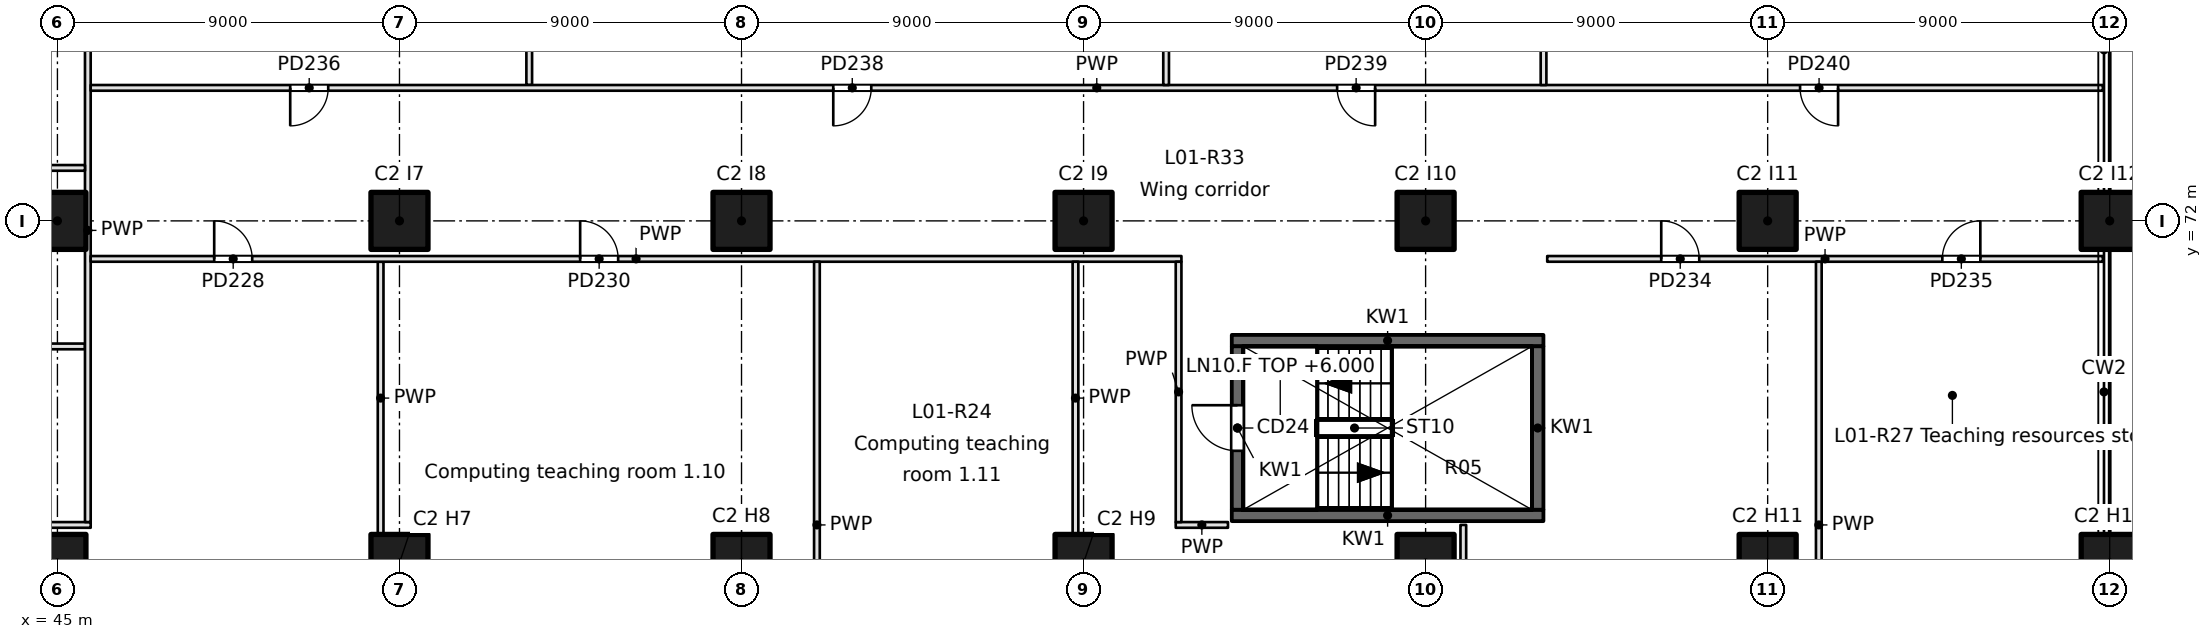
"""IFC4 building model, lengths in metres.
Left out: names, types, materials, properties, quantities, classifications, styles, units other than length and angle.
Written with IfcOpenShell. Run it as: python <this file> out.ifc"""

import sys

from ifc_helpers import new_model, si_unit, direction, frame, frame_2d, origin, origin_2d, place, context, subcontext, project, spatial, rectangle, extrude, element, fill, save


model = new_model("IFC4")
c1 = context("Model", 3, precision=1e-05, world=origin(), true_north=direction((0.0, 1.0)))
c2 = subcontext(c1, "Body", "Model", "MODEL_VIEW")
j1 = project(units=[si_unit("LENGTHUNIT", "METRE"), si_unit("PLANEANGLEUNIT", "RADIAN")], contexts=[c1])
p1 = place(None, origin())
s1 = spatial("IfcSite", under=j1, at=p1, CompositionType="ELEMENT")
p2 = place(p1, origin())
s2 = spatial("IfcBuilding", under=s1, at=p2, CompositionType="ELEMENT")
p3 = place(p2, frame((0.0, 0.0, 6.0)))
s3 = spatial("IfcBuildingStorey", under=s2, at=p3, CompositionType="ELEMENT", Elevation=6.0)
for number, where, z_axis, x_axis in (
    (1, (99.0, 63.0, 0.0), (0.0, 0.0, 1.0), (1.0, 0.0, 0.0)),
    (2, (99.0, 72.0, 0.0), (0.0, 0.0, 1.0), (1.0, 0.0, 0.0)),
    (3, (45.0, 63.0, 0.0), (0.0, 0.0, 1.0), (1.0, 0.0, 0.0)),
    (4, (45.0, 72.0, 0.0), (0.0, 0.0, 1.0), (1.0, 0.0, 0.0)),
    (5, (54.0, 63.0, 0.0), (0.0, 0.0, 1.0), (1.0, 0.0, 0.0)),
    (6, (54.0, 72.0, 0.0), (0.0, 0.0, 1.0), (1.0, 0.0, 0.0)),
    (7, (63.0, 63.0, 0.0), (0.0, 0.0, 1.0), (1.0, 0.0, 0.0)),
    (8, (63.0, 72.0, 0.0), (0.0, 0.0, 1.0), (1.0, 0.0, 0.0)),
    (9, (72.0, 63.0, 0.0), (0.0, 0.0, 1.0), (1.0, 0.0, 0.0)),
    (10, (72.0, 72.0, 0.0), (0.0, 0.0, 1.0), (1.0, 0.0, 0.0)),
    (11, (81.0, 63.0, 0.0), (0.0, 0.0, 1.0), (1.0, 0.0, 0.0)),
    (12, (81.0, 72.0, 0.0), (0.0, 0.0, 1.0), (1.0, 0.0, 0.0)),
    (13, (90.0, 63.0, 0.0), (0.0, 0.0, 1.0), (1.0, 0.0, 0.0)),
    (14, (90.0, 72.0, 0.0), (0.0, 0.0, 1.0), (1.0, 0.0, 0.0)),
):
    element("IfcColumn", number, at=place(p3, frame(where, z_axis=z_axis, x_axis=x_axis)), inside=s3, PredefinedType="COLUMN", context=c2, shape_type="SweptSolid", body=[
        extrude(rectangle(XDim=1.5, YDim=1.5, at=origin_2d()), origin(), (0.0, 0.0, 1.0), 5.4),
    ])
for number, where, z_axis, x_axis in (
    (15, (75.9, 64.25, -0.35), (0.0, 0.0, 1.0), (1.0, 0.0, 0.0)),
    (16, (75.9, 68.85, -0.35), (0.0, 0.0, 1.0), (1.0, 0.0, 0.0)),
):
    element("IfcWall", number, at=place(p3, frame(where, z_axis=z_axis, x_axis=x_axis)), inside=s3, PredefinedType="SOLIDWALL", context=c2, shape_type="SweptSolid", body=[
        extrude(rectangle(XDim=8.2, YDim=0.3, at=frame_2d((4.1, 0.0))), origin(), (0.0, 0.0, 1.0), 5.4),
    ])
p4 = place(p3, frame((76.05, 64.4, -0.35), z_axis=(0.0, 0.0, 1.0), x_axis=(0.0, 1.0, 0.0)))
e17 = element("IfcWall", 17, at=p4, inside=s3, PredefinedType="SOLIDWALL", context=c2, shape_type="SweptSolid", body=[
    extrude(rectangle(XDim=4.3, YDim=0.3, at=frame_2d((2.15, 0.0))), origin(), (0.0, 0.0, 1.0), 5.4),
])
p5 = place(p4, frame((1.55, 0.0, 0.35)))
e18 = element("IfcOpeningElement", 18, at=p5, cuts=e17, PredefinedType="OPENING", context=c2, shape_type="SweptSolid", body=[
    extrude(rectangle(XDim=1.2, YDim=2.1, at=frame_2d((0.6, 1.05))), frame((0.0, 0.15, 0.0), z_axis=(0.0, -1.0, 0.0), x_axis=(1.0, 0.0, 0.0)), (0.0, 0.0, 1.0), 0.3),
])
p6 = place(p3, frame((83.95, 64.4, -0.35), z_axis=(0.0, 0.0, 1.0), x_axis=(0.0, 1.0, 0.0)))
e19 = element("IfcWall", 19, at=p6, inside=s3, PredefinedType="SOLIDWALL", context=c2, shape_type="SweptSolid", body=[
    extrude(rectangle(XDim=4.3, YDim=0.3, at=frame_2d((2.15, 0.0))), origin(), (0.0, 0.0, 1.0), 5.4),
])
p7 = place(p3, frame((40.575, 68.697, 0.0), z_axis=(0.0, 0.0, 1.0), x_axis=(1.0, 0.0, 0.0)))
e20 = element("IfcWall", 20, at=p7, inside=s3, PredefinedType="PARTITIONING", context=c2, shape_type="SweptSolid", body=[
    extrude(rectangle(XDim=5.15, YDim=0.15, at=frame_2d((2.575, 0.0))), origin(), (0.0, 0.0, 1.0), 5.05),
])
p8 = place(p3, frame((45.875, 64.0, 0.0), z_axis=(0.0, 0.0, 1.0), x_axis=(-1.0, 0.0, 0.0)))
e21 = element("IfcWall", 21, at=p8, inside=s3, PredefinedType="PARTITIONING", context=c2, shape_type="SweptSolid", body=[
    extrude(rectangle(XDim=5.45, YDim=0.15, at=frame_2d((2.725, 0.0))), origin(), (0.0, 0.0, 1.0), 5.05),
])
p9 = place(p3, frame((74.425, 64.0, 0.0), z_axis=(0.0, 0.0, 1.0), x_axis=(1.0, 0.0, 0.0)))
e22 = element("IfcWall", 22, at=p9, inside=s3, PredefinedType="PARTITIONING", context=c2, shape_type="SweptSolid", body=[
    extrude(rectangle(XDim=1.375, YDim=0.15, at=frame_2d((0.688, 0.0))), origin(), (0.0, 0.0, 1.0), 5.05),
])
p10 = place(p3, frame((45.8, 79.425, 0.0), z_axis=(0.0, 0.0, 1.0), x_axis=(0.0, -1.0, 0.0)))
e23 = element("IfcWall", 23, at=p10, inside=s3, PredefinedType="PARTITIONING", context=c2, shape_type="SweptSolid", body=[
    extrude(rectangle(XDim=15.35, YDim=0.15, at=frame_2d((7.675, 0.0))), origin(), (0.0, 0.0, 1.0), 5.05),
])
p11 = place(p3, frame((40.575, 73.394, 0.0), z_axis=(0.0, 0.0, 1.0), x_axis=(1.0, 0.0, 0.0)))
e24 = element("IfcWall", 24, at=p11, inside=s3, PredefinedType="PARTITIONING", context=c2, shape_type="SweptSolid", body=[
    extrude(rectangle(XDim=5.15, YDim=0.15, at=frame_2d((2.575, 0.0))), origin(), (0.0, 0.0, 1.0), 5.05),
])
p12 = place(p3, frame((53.504, 63.75, 0.0), z_axis=(0.0, 0.0, 1.0), x_axis=(0.0, 1.0, 0.0)))
e25 = element("IfcWall", 25, at=p12, inside=s3, PredefinedType="PARTITIONING", context=c2, shape_type="SweptSolid", body=[
    extrude(rectangle(XDim=7.175, YDim=0.15, at=frame_2d((3.587, 0.0))), origin(), (0.0, 0.0, 1.0), 5.05),
])
p13 = place(p3, frame((45.875, 71.0, 0.0), z_axis=(0.0, 0.0, 1.0), x_axis=(1.0, 0.0, 0.0)))
e26 = element("IfcWall", 26, at=p13, inside=s3, PredefinedType="PARTITIONING", context=c2, shape_type="SweptSolid", body=[
    extrude(rectangle(XDim=28.7, YDim=0.15, at=frame_2d((14.35, 0.0))), origin(), (0.0, 0.0, 1.0), 5.05),
])
p14 = place(p13, frame((3.25, 0.0, 0.0)))
e27 = element("IfcOpeningElement", 27, at=p14, cuts=e26, PredefinedType="OPENING", context=c2, shape_type="SweptSolid", body=[
    extrude(rectangle(XDim=1.0, YDim=2.1, at=frame_2d((0.5, 1.05))), frame((0.0, 0.075, 0.0), z_axis=(0.0, -1.0, 0.0), x_axis=(1.0, 0.0, 0.0)), (0.0, 0.0, 1.0), 0.15),
])
p15 = place(p13, frame((12.879, 0.0, 0.0)))
e28 = element("IfcOpeningElement", 28, at=p15, cuts=e26, PredefinedType="OPENING", context=c2, shape_type="SweptSolid", body=[
    extrude(rectangle(XDim=1.0, YDim=2.1, at=frame_2d((0.5, 1.05))), frame((0.0, 0.075, 0.0), z_axis=(0.0, -1.0, 0.0), x_axis=(1.0, 0.0, 0.0)), (0.0, 0.0, 1.0), 0.15),
])
p16 = place(p3, frame((84.2, 71.0, 0.0), z_axis=(0.0, 0.0, 1.0), x_axis=(1.0, 0.0, 0.0)))
e29 = element("IfcWall", 29, at=p16, inside=s3, PredefinedType="PARTITIONING", context=c2, shape_type="SweptSolid", body=[
    extrude(rectangle(XDim=14.62, YDim=0.15, at=frame_2d((7.31, 0.0))), origin(), (0.0, 0.0, 1.0), 5.05),
])
p17 = place(p16, frame((3.0, 0.0, 0.0)))
e30 = element("IfcOpeningElement", 30, at=p17, cuts=e29, PredefinedType="OPENING", context=c2, shape_type="SweptSolid", body=[
    extrude(rectangle(XDim=1.0, YDim=2.1, at=frame_2d((0.5, 1.05))), frame((0.0, 0.075, 0.0), z_axis=(0.0, -1.0, 0.0), x_axis=(1.0, 0.0, 0.0)), (0.0, 0.0, 1.0), 0.15),
])
p18 = place(p16, frame((10.396, 0.0, 0.0)))
e31 = element("IfcOpeningElement", 31, at=p18, cuts=e29, PredefinedType="OPENING", context=c2, shape_type="SweptSolid", body=[
    extrude(rectangle(XDim=1.0, YDim=2.1, at=frame_2d((0.5, 1.05))), frame((0.0, 0.075, 0.0), z_axis=(0.0, -1.0, 0.0), x_axis=(1.0, 0.0, 0.0)), (0.0, 0.0, 1.0), 0.15),
])
p19 = place(p3, frame((64.984, 57.075, 0.0), z_axis=(0.0, 0.0, 1.0), x_axis=(0.0, 1.0, 0.0)))
e32 = element("IfcWall", 32, at=p19, inside=s3, PredefinedType="PARTITIONING", context=c2, shape_type="SweptSolid", body=[
    extrude(rectangle(XDim=13.85, YDim=0.15, at=frame_2d((6.925, 0.0))), origin(), (0.0, 0.0, 1.0), 5.05),
])
p20 = place(p3, frame((71.787, 63.75, 0.0), z_axis=(0.0, 0.0, 1.0), x_axis=(0.0, 1.0, 0.0)))
e33 = element("IfcWall", 33, at=p20, inside=s3, PredefinedType="PARTITIONING", context=c2, shape_type="SweptSolid", body=[
    extrude(rectangle(XDim=7.175, YDim=0.15, at=frame_2d((3.587, 0.0))), origin(), (0.0, 0.0, 1.0), 5.05),
])
p21 = place(p3, frame((81.992, 57.075, 0.0), z_axis=(0.0, 0.0, 1.0), x_axis=(0.0, 1.0, 0.0)))
e34 = element("IfcWall", 34, at=p21, inside=s3, PredefinedType="PARTITIONING", context=c2, shape_type="SweptSolid", body=[
    extrude(rectangle(XDim=6.925, YDim=0.15, at=frame_2d((3.462, 0.0))), origin(), (0.0, 0.0, 1.0), 5.05),
])
p22 = place(p3, frame((74.5, 70.925, 0.0), z_axis=(0.0, 0.0, 1.0), x_axis=(0.0, -1.0, 0.0)))
e35 = element("IfcWall", 35, at=p22, inside=s3, PredefinedType="PARTITIONING", context=c2, shape_type="SweptSolid", body=[
    extrude(rectangle(XDim=6.85, YDim=0.15, at=frame_2d((3.425, 0.0))), origin(), (0.0, 0.0, 1.0), 5.05),
])
p23 = place(p3, frame((91.346, 57.075, 0.0), z_axis=(0.0, 0.0, 1.0), x_axis=(0.0, 1.0, 0.0)))
e36 = element("IfcWall", 36, at=p23, inside=s3, PredefinedType="PARTITIONING", context=c2, shape_type="SweptSolid", body=[
    extrude(rectangle(XDim=13.85, YDim=0.15, at=frame_2d((6.925, 0.0))), origin(), (0.0, 0.0, 1.0), 5.05),
])
p24 = place(p3, frame((57.414, 75.575, 0.0), z_axis=(0.0, 0.0, 1.0), x_axis=(0.0, 1.0, 0.0)))
e37 = element("IfcWall", 37, at=p24, inside=s3, PredefinedType="PARTITIONING", context=c2, shape_type="SweptSolid", body=[
    extrude(rectangle(XDim=17.925, YDim=0.15, at=frame_2d((8.962, 0.0))), origin(), (0.0, 0.0, 1.0), 5.05),
])
p25 = place(p3, frame((98.82, 75.5, 0.0), z_axis=(0.0, 0.0, 1.0), x_axis=(-1.0, 0.0, 0.0)))
e38 = element("IfcWall", 38, at=p25, inside=s3, PredefinedType="PARTITIONING", context=c2, shape_type="SweptSolid", body=[
    extrude(rectangle(XDim=52.945, YDim=0.15, at=frame_2d((26.473, 0.0))), origin(), (0.0, 0.0, 1.0), 5.05),
])
p26 = place(p25, frame((46.695, 0.0, 0.0)))
e39 = element("IfcOpeningElement", 39, at=p26, cuts=e38, PredefinedType="OPENING", context=c2, shape_type="SweptSolid", body=[
    extrude(rectangle(XDim=1.0, YDim=2.1, at=frame_2d((0.5, 1.05))), frame((0.0, 0.075, 0.0), z_axis=(0.0, -1.0, 0.0), x_axis=(1.0, 0.0, 0.0)), (0.0, 0.0, 1.0), 0.15),
])
p27 = place(p25, frame((32.406, 0.0, 0.0)))
e40 = element("IfcOpeningElement", 40, at=p27, cuts=e38, PredefinedType="OPENING", context=c2, shape_type="SweptSolid", body=[
    extrude(rectangle(XDim=1.0, YDim=2.1, at=frame_2d((0.5, 1.05))), frame((0.0, 0.075, 0.0), z_axis=(0.0, -1.0, 0.0), x_axis=(1.0, 0.0, 0.0)), (0.0, 0.0, 1.0), 0.15),
])
p28 = place(p25, frame((19.148, 0.0, 0.0)))
e41 = element("IfcOpeningElement", 41, at=p28, cuts=e38, PredefinedType="OPENING", context=c2, shape_type="SweptSolid", body=[
    extrude(rectangle(XDim=1.0, YDim=2.1, at=frame_2d((0.5, 1.05))), frame((0.0, 0.075, 0.0), z_axis=(0.0, -1.0, 0.0), x_axis=(1.0, 0.0, 0.0)), (0.0, 0.0, 1.0), 0.15),
])
p29 = place(p25, frame((6.967, 0.0, 0.0)))
e42 = element("IfcOpeningElement", 42, at=p29, cuts=e38, PredefinedType="OPENING", context=c2, shape_type="SweptSolid", body=[
    extrude(rectangle(XDim=1.0, YDim=2.1, at=frame_2d((0.5, 1.05))), frame((0.0, 0.075, 0.0), z_axis=(0.0, -1.0, 0.0), x_axis=(1.0, 0.0, 0.0)), (0.0, 0.0, 1.0), 0.15),
])
p30 = place(p3, frame((74.172, 75.575, 0.0), z_axis=(0.0, 0.0, 1.0), x_axis=(0.0, 1.0, 0.0)))
e43 = element("IfcWall", 43, at=p30, inside=s3, PredefinedType="PARTITIONING", context=c2, shape_type="SweptSolid", body=[
    extrude(rectangle(XDim=17.925, YDim=0.15, at=frame_2d((8.962, 0.0))), origin(), (0.0, 0.0, 1.0), 5.05),
])
p31 = place(p3, frame((84.103, 75.575, 0.0), z_axis=(0.0, 0.0, 1.0), x_axis=(0.0, 1.0, 0.0)))
e44 = element("IfcWall", 44, at=p31, inside=s3, PredefinedType="PARTITIONING", context=c2, shape_type="SweptSolid", body=[
    extrude(rectangle(XDim=22.525, YDim=0.15, at=frame_2d((11.263, 0.0))), origin(), (0.0, 0.0, 1.0), 5.05),
])
p32 = place(p5, origin())
e45 = element("IfcDoor", 45, at=p32, inside=s3, OperationType="SINGLE_SWING_RIGHT", PredefinedType="DOOR", context=c2, shape_type="SweptSolid", body=[
    extrude(rectangle(XDim=1.2, YDim=2.1, at=frame_2d((0.6, 1.05))), frame((0.0, 0.025, 0.0), z_axis=(0.0, -1.0, 0.0), x_axis=(1.0, 0.0, 0.0)), (0.0, 0.0, 1.0), 0.05),
])
fill(e18, e45)
p33 = place(p14, origin())
e46 = element("IfcDoor", 46, at=p33, inside=s3, OperationType="SINGLE_SWING_LEFT", PredefinedType="DOOR", context=c2, shape_type="SweptSolid", body=[
    extrude(rectangle(XDim=1.0, YDim=2.1, at=frame_2d((0.5, 1.05))), frame((0.0, 0.025, 0.0), z_axis=(0.0, -1.0, 0.0), x_axis=(1.0, 0.0, 0.0)), (0.0, 0.0, 1.0), 0.05),
])
fill(e27, e46)
p34 = place(p15, origin())
e47 = element("IfcDoor", 47, at=p34, inside=s3, OperationType="SINGLE_SWING_LEFT", PredefinedType="DOOR", context=c2, shape_type="SweptSolid", body=[
    extrude(rectangle(XDim=1.0, YDim=2.1, at=frame_2d((0.5, 1.05))), frame((0.0, 0.025, 0.0), z_axis=(0.0, -1.0, 0.0), x_axis=(1.0, 0.0, 0.0)), (0.0, 0.0, 1.0), 0.05),
])
fill(e28, e47)
p35 = place(p17, origin())
e48 = element("IfcDoor", 48, at=p35, inside=s3, OperationType="SINGLE_SWING_LEFT", PredefinedType="DOOR", context=c2, shape_type="SweptSolid", body=[
    extrude(rectangle(XDim=1.0, YDim=2.1, at=frame_2d((0.5, 1.05))), frame((0.0, 0.025, 0.0), z_axis=(0.0, -1.0, 0.0), x_axis=(1.0, 0.0, 0.0)), (0.0, 0.0, 1.0), 0.05),
])
fill(e30, e48)
p36 = place(p18, origin())
e49 = element("IfcDoor", 49, at=p36, inside=s3, OperationType="SINGLE_SWING_RIGHT", PredefinedType="DOOR", context=c2, shape_type="SweptSolid", body=[
    extrude(rectangle(XDim=1.0, YDim=2.1, at=frame_2d((0.5, 1.05))), frame((0.0, 0.025, 0.0), z_axis=(0.0, -1.0, 0.0), x_axis=(1.0, 0.0, 0.0)), (0.0, 0.0, 1.0), 0.05),
])
fill(e31, e49)
p37 = place(p26, origin())
e50 = element("IfcDoor", 50, at=p37, inside=s3, OperationType="SINGLE_SWING_RIGHT", PredefinedType="DOOR", context=c2, shape_type="SweptSolid", body=[
    extrude(rectangle(XDim=1.0, YDim=2.1, at=frame_2d((0.5, 1.05))), frame((0.0, 0.025, 0.0), z_axis=(0.0, -1.0, 0.0), x_axis=(1.0, 0.0, 0.0)), (0.0, 0.0, 1.0), 0.05),
])
fill(e39, e50)
p38 = place(p27, origin())
e51 = element("IfcDoor", 51, at=p38, inside=s3, OperationType="SINGLE_SWING_RIGHT", PredefinedType="DOOR", context=c2, shape_type="SweptSolid", body=[
    extrude(rectangle(XDim=1.0, YDim=2.1, at=frame_2d((0.5, 1.05))), frame((0.0, 0.025, 0.0), z_axis=(0.0, -1.0, 0.0), x_axis=(1.0, 0.0, 0.0)), (0.0, 0.0, 1.0), 0.05),
])
fill(e40, e51)
p39 = place(p28, origin())
e52 = element("IfcDoor", 52, at=p39, inside=s3, OperationType="SINGLE_SWING_LEFT", PredefinedType="DOOR", context=c2, shape_type="SweptSolid", body=[
    extrude(rectangle(XDim=1.0, YDim=2.1, at=frame_2d((0.5, 1.05))), frame((0.0, 0.025, 0.0), z_axis=(0.0, -1.0, 0.0), x_axis=(1.0, 0.0, 0.0)), (0.0, 0.0, 1.0), 0.05),
])
fill(e41, e52)
p40 = place(p29, origin())
e53 = element("IfcDoor", 53, at=p40, inside=s3, OperationType="SINGLE_SWING_LEFT", PredefinedType="DOOR", context=c2, shape_type="SweptSolid", body=[
    extrude(rectangle(XDim=1.0, YDim=2.1, at=frame_2d((0.5, 1.05))), frame((0.0, 0.025, 0.0), z_axis=(0.0, -1.0, 0.0), x_axis=(1.0, 0.0, 0.0)), (0.0, 0.0, 1.0), 0.05),
])
fill(e42, e53)
save(model, sys.argv[1])
